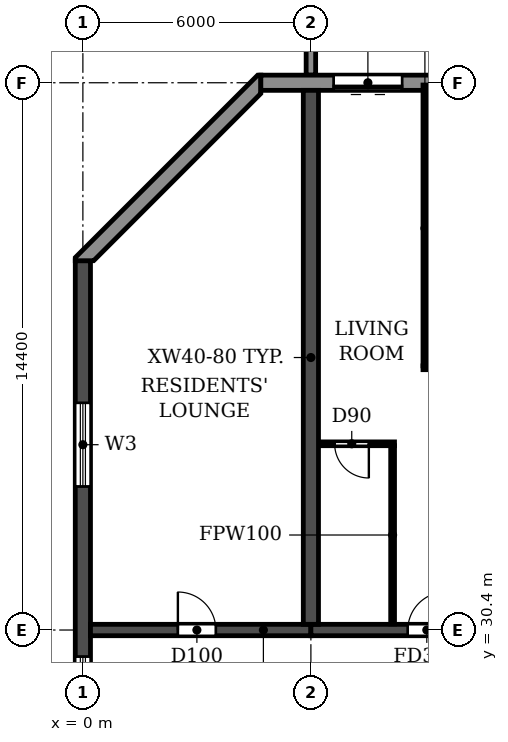
"""IFC4 building model, lengths in metres.
Left out: names, types, materials, properties, quantities, classifications, styles, units other than length and angle.
Written with IfcOpenShell. Run it as: python <this file> out.ifc"""

import sys

from ifc_helpers import new_model, si_unit, direction, frame, frame_2d, origin, place, context, subcontext, project, spatial, polyline, rectangle, outline, extrude, source, transform, mapped, element, fill, save


model = new_model("IFC4")
c1 = context("Model", 3, precision=1e-05, world=origin(), true_north=direction((0.0, 1.0)))
c2 = subcontext(c1, "Body", "Model", "MODEL_VIEW")
j1 = project(units=[si_unit("LENGTHUNIT", "METRE"), si_unit("PLANEANGLEUNIT", "RADIAN")], contexts=[c1])
p1 = place(None, origin())
s1 = spatial("IfcSite", under=j1, at=p1, CompositionType="ELEMENT")
p2 = place(p1, origin())
s2 = spatial("IfcBuilding", under=s1, at=p2, CompositionType="ELEMENT")
p3 = place(p2, frame((0.0, 0.0, 43.2)))
s3 = spatial("IfcBuildingStorey", under=s2, at=p3, CompositionType="ELEMENT", Elevation=43.2)
p4 = place(p3, frame((6.0, 30.55, 0.0), z_axis=(0.0, 0.0, 1.0), x_axis=(0.0, 1.0, 0.0)))
e1 = element("IfcWall", 1, at=p4, inside=s3, PredefinedType="SHEAR", context=c2, shape_type="SweptSolid", body=[
    extrude(rectangle(XDim=14.05, YDim=0.4, at=frame_2d((7.025, 0.0))), origin(), (0.0, 0.0, 1.0), 3.05),
])
p5 = place(p3, frame((0.0, 4.683, 0.0), z_axis=(0.0, 0.0, 1.0), x_axis=(0.0, 1.0, 0.0)))
e2 = element("IfcWall", 2, at=p5, inside=s3, PredefinedType="SHEAR", context=c2, shape_type="SweptSolid", body=[
    extrude(rectangle(XDim=35.434, YDim=0.4, at=frame_2d((17.717, 0.0))), origin(), (0.0, 0.0, 1.0), 3.05),
])
p6 = place(p5, frame((23.817, 0.0, 0.9)))
e3 = element("IfcOpeningElement", 3, at=p6, cuts=e2, PredefinedType="OPENING", context=c2, shape_type="SweptSolid", body=[
    extrude(rectangle(XDim=1.2, YDim=1.5, at=frame_2d((0.6, 0.75))), frame((0.0, 0.21, 0.0), z_axis=(0.0, -1.0, 0.0), x_axis=(1.0, 0.0, 0.0)), (0.0, 0.0, 1.0), 0.42),
])
p7 = place(p5, frame((8.017, 0.0, 0.9)))
e4 = element("IfcOpeningElement", 4, at=p7, cuts=e2, PredefinedType="OPENING", context=c2, shape_type="SweptSolid", body=[
    extrude(rectangle(XDim=1.2, YDim=1.5, at=frame_2d((0.6, 0.75))), frame((0.0, 0.21, 0.0), z_axis=(0.0, -1.0, 0.0), x_axis=(1.0, 0.0, 0.0)), (0.0, 0.0, 1.0), 0.42),
])
p8 = place(p5, frame((15.917, 0.0, 0.9)))
e5 = element("IfcOpeningElement", 5, at=p8, cuts=e2, PredefinedType="OPENING", context=c2, shape_type="SweptSolid", body=[
    extrude(rectangle(XDim=1.2, YDim=1.5, at=frame_2d((0.6, 0.75))), frame((0.0, 0.21, 0.0), z_axis=(0.0, -1.0, 0.0), x_axis=(1.0, 0.0, 0.0)), (0.0, 0.0, 1.0), 0.42),
])
p9 = place(p5, frame((29.493, 0.0, 0.6)))
e6 = element("IfcOpeningElement", 6, at=p9, cuts=e2, PredefinedType="OPENING", context=c2, shape_type="SweptSolid", body=[
    extrude(rectangle(XDim=2.2, YDim=1.8, at=frame_2d((1.1, 0.9))), frame((0.0, 0.21, 0.0), z_axis=(0.0, -1.0, 0.0), x_axis=(1.0, 0.0, 0.0)), (0.0, 0.0, 1.0), 0.42),
])
p10 = place(p5, frame((2.541, 0.0, 0.6)))
e7 = element("IfcOpeningElement", 7, at=p10, cuts=e2, PredefinedType="OPENING", context=c2, shape_type="SweptSolid", body=[
    extrude(rectangle(XDim=2.2, YDim=1.8, at=frame_2d((1.1, 0.9))), frame((0.0, 0.21, 0.0), z_axis=(0.0, -1.0, 0.0), x_axis=(1.0, 0.0, 0.0)), (0.0, 0.0, 1.0), 0.42),
])
p11 = place(p3, frame((0.2, 30.4, 0.0), z_axis=(0.0, 0.0, 1.0), x_axis=(1.0, 0.0, 0.0)))
e8 = element("IfcWall", 8, at=p11, inside=s3, PredefinedType="SHEAR", context=c2, shape_type="SweptSolid", body=[
    extrude(rectangle(XDim=5.8, YDim=0.3, at=frame_2d((2.9, 0.0))), origin(), (0.0, 0.0, 1.0), 2.45),
])
p12 = place(p11, frame((2.3, 0.0, 0.0)))
e9 = element("IfcOpeningElement", 9, at=p12, cuts=e8, PredefinedType="OPENING", context=c2, shape_type="SweptSolid", body=[
    extrude(rectangle(XDim=1.0, YDim=2.1, at=frame_2d((0.5, 1.05))), frame((0.0, 0.16, 0.0), z_axis=(0.0, -1.0, 0.0), x_axis=(1.0, 0.0, 0.0)), (0.0, 0.0, 1.0), 0.32),
])
p13 = place(p3, frame((6.0, 30.4, 0.0), z_axis=(0.0, 0.0, 1.0), x_axis=(1.0, 0.0, 0.0)))
e10 = element("IfcWall", 10, at=p13, inside=s3, PredefinedType="SHEAR", context=c2, shape_type="SweptSolid", body=[
    extrude(rectangle(XDim=6.0, YDim=0.3, at=frame_2d((3.0, 0.0))), origin(), (0.0, 0.0, 1.0), 2.45),
])
p14 = place(p13, frame((2.55, 0.0, 0.0)))
e11 = element("IfcOpeningElement", 11, at=p14, cuts=e10, PredefinedType="OPENING", context=c2, shape_type="SweptSolid", body=[
    extrude(rectangle(XDim=1.0, YDim=2.1, at=frame_2d((0.5, 1.05))), frame((0.0, 0.16, 0.0), z_axis=(0.0, -1.0, 0.0), x_axis=(1.0, 0.0, 0.0)), (0.0, 0.0, 1.0), 0.32),
])
p15 = place(p3, frame((97.317, 44.8, 0.0), z_axis=(0.0, 0.0, 1.0), x_axis=(-1.0, 0.0, 0.0)))
e12 = element("IfcWall", 12, at=p15, inside=s3, PredefinedType="STANDARD", context=c2, shape_type="SweptSolid", body=[
    extrude(rectangle(XDim=92.634, YDim=0.4, at=frame_2d((46.317, 0.0))), origin(), (0.0, 0.0, 1.0), 3.05),
])
p16 = place(p15, frame((88.917, 0.0, 0.0)))
e13 = element("IfcOpeningElement", 13, at=p16, cuts=e12, PredefinedType="OPENING", context=c2, shape_type="SweptSolid", body=[
    extrude(rectangle(XDim=1.8, YDim=2.4, at=frame_2d((0.9, 1.2))), frame((0.0, 0.21, 0.0), z_axis=(0.0, -1.0, 0.0), x_axis=(1.0, 0.0, 0.0)), (0.0, 0.0, 1.0), 0.42),
])
p17 = place(p15, frame((85.717, 0.0, 0.9)))
e14 = element("IfcOpeningElement", 14, at=p17, cuts=e12, PredefinedType="OPENING", context=c2, shape_type="SweptSolid", body=[
    extrude(rectangle(XDim=2.2, YDim=1.5, at=frame_2d((1.1, 0.75))), frame((0.0, 0.21, 0.0), z_axis=(0.0, -1.0, 0.0), x_axis=(1.0, 0.0, 0.0)), (0.0, 0.0, 1.0), 0.42),
])
p18 = place(p15, frame((82.717, 0.0, 0.9)))
e15 = element("IfcOpeningElement", 15, at=p18, cuts=e12, PredefinedType="OPENING", context=c2, shape_type="SweptSolid", body=[
    extrude(rectangle(XDim=2.2, YDim=1.5, at=frame_2d((1.1, 0.75))), frame((0.0, 0.21, 0.0), z_axis=(0.0, -1.0, 0.0), x_axis=(1.0, 0.0, 0.0)), (0.0, 0.0, 1.0), 0.42),
])
p19 = place(p15, frame((79.717, 0.0, 0.9)))
e16 = element("IfcOpeningElement", 16, at=p19, cuts=e12, PredefinedType="OPENING", context=c2, shape_type="SweptSolid", body=[
    extrude(rectangle(XDim=2.2, YDim=1.5, at=frame_2d((1.1, 0.75))), frame((0.0, 0.21, 0.0), z_axis=(0.0, -1.0, 0.0), x_axis=(1.0, 0.0, 0.0)), (0.0, 0.0, 1.0), 0.42),
])
p20 = place(p15, frame((76.717, 0.0, 0.9)))
e17 = element("IfcOpeningElement", 17, at=p20, cuts=e12, PredefinedType="OPENING", context=c2, shape_type="SweptSolid", body=[
    extrude(rectangle(XDim=2.2, YDim=1.5, at=frame_2d((1.1, 0.75))), frame((0.0, 0.21, 0.0), z_axis=(0.0, -1.0, 0.0), x_axis=(1.0, 0.0, 0.0)), (0.0, 0.0, 1.0), 0.42),
])
p21 = place(p15, frame((73.917, 0.0, 0.0)))
e18 = element("IfcOpeningElement", 18, at=p21, cuts=e12, PredefinedType="OPENING", context=c2, shape_type="SweptSolid", body=[
    extrude(rectangle(XDim=1.8, YDim=2.4, at=frame_2d((0.9, 1.2))), frame((0.0, 0.21, 0.0), z_axis=(0.0, -1.0, 0.0), x_axis=(1.0, 0.0, 0.0)), (0.0, 0.0, 1.0), 0.42),
])
p22 = place(p15, frame((70.717, 0.0, 0.9)))
e19 = element("IfcOpeningElement", 19, at=p22, cuts=e12, PredefinedType="OPENING", context=c2, shape_type="SweptSolid", body=[
    extrude(rectangle(XDim=2.2, YDim=1.5, at=frame_2d((1.1, 0.75))), frame((0.0, 0.21, 0.0), z_axis=(0.0, -1.0, 0.0), x_axis=(1.0, 0.0, 0.0)), (0.0, 0.0, 1.0), 0.42),
])
p23 = place(p15, frame((67.717, 0.0, 0.9)))
e20 = element("IfcOpeningElement", 20, at=p23, cuts=e12, PredefinedType="OPENING", context=c2, shape_type="SweptSolid", body=[
    extrude(rectangle(XDim=2.2, YDim=1.5, at=frame_2d((1.1, 0.75))), frame((0.0, 0.21, 0.0), z_axis=(0.0, -1.0, 0.0), x_axis=(1.0, 0.0, 0.0)), (0.0, 0.0, 1.0), 0.42),
])
p24 = place(p15, frame((64.717, 0.0, 0.9)))
e21 = element("IfcOpeningElement", 21, at=p24, cuts=e12, PredefinedType="OPENING", context=c2, shape_type="SweptSolid", body=[
    extrude(rectangle(XDim=2.2, YDim=1.5, at=frame_2d((1.1, 0.75))), frame((0.0, 0.21, 0.0), z_axis=(0.0, -1.0, 0.0), x_axis=(1.0, 0.0, 0.0)), (0.0, 0.0, 1.0), 0.42),
])
p25 = place(p15, frame((61.917, 0.0, 0.0)))
e22 = element("IfcOpeningElement", 22, at=p25, cuts=e12, PredefinedType="OPENING", context=c2, shape_type="SweptSolid", body=[
    extrude(rectangle(XDim=1.8, YDim=2.4, at=frame_2d((0.9, 1.2))), frame((0.0, 0.21, 0.0), z_axis=(0.0, -1.0, 0.0), x_axis=(1.0, 0.0, 0.0)), (0.0, 0.0, 1.0), 0.42),
])
p26 = place(p15, frame((58.717, 0.0, 0.9)))
e23 = element("IfcOpeningElement", 23, at=p26, cuts=e12, PredefinedType="OPENING", context=c2, shape_type="SweptSolid", body=[
    extrude(rectangle(XDim=2.2, YDim=1.5, at=frame_2d((1.1, 0.75))), frame((0.0, 0.21, 0.0), z_axis=(0.0, -1.0, 0.0), x_axis=(1.0, 0.0, 0.0)), (0.0, 0.0, 1.0), 0.42),
])
p27 = place(p15, frame((55.717, 0.0, 0.9)))
e24 = element("IfcOpeningElement", 24, at=p27, cuts=e12, PredefinedType="OPENING", context=c2, shape_type="SweptSolid", body=[
    extrude(rectangle(XDim=2.2, YDim=1.5, at=frame_2d((1.1, 0.75))), frame((0.0, 0.21, 0.0), z_axis=(0.0, -1.0, 0.0), x_axis=(1.0, 0.0, 0.0)), (0.0, 0.0, 1.0), 0.42),
])
p28 = place(p15, frame((52.717, 0.0, 0.9)))
e25 = element("IfcOpeningElement", 25, at=p28, cuts=e12, PredefinedType="OPENING", context=c2, shape_type="SweptSolid", body=[
    extrude(rectangle(XDim=2.2, YDim=1.5, at=frame_2d((1.1, 0.75))), frame((0.0, 0.21, 0.0), z_axis=(0.0, -1.0, 0.0), x_axis=(1.0, 0.0, 0.0)), (0.0, 0.0, 1.0), 0.42),
])
p29 = place(p15, frame((49.917, 0.0, 0.0)))
e26 = element("IfcOpeningElement", 26, at=p29, cuts=e12, PredefinedType="OPENING", context=c2, shape_type="SweptSolid", body=[
    extrude(rectangle(XDim=1.8, YDim=2.4, at=frame_2d((0.9, 1.2))), frame((0.0, 0.21, 0.0), z_axis=(0.0, -1.0, 0.0), x_axis=(1.0, 0.0, 0.0)), (0.0, 0.0, 1.0), 0.42),
])
p30 = place(p15, frame((46.717, 0.0, 0.9)))
e27 = element("IfcOpeningElement", 27, at=p30, cuts=e12, PredefinedType="OPENING", context=c2, shape_type="SweptSolid", body=[
    extrude(rectangle(XDim=2.2, YDim=1.5, at=frame_2d((1.1, 0.75))), frame((0.0, 0.21, 0.0), z_axis=(0.0, -1.0, 0.0), x_axis=(1.0, 0.0, 0.0)), (0.0, 0.0, 1.0), 0.42),
])
p31 = place(p15, frame((43.717, 0.0, 0.9)))
e28 = element("IfcOpeningElement", 28, at=p31, cuts=e12, PredefinedType="OPENING", context=c2, shape_type="SweptSolid", body=[
    extrude(rectangle(XDim=2.2, YDim=1.5, at=frame_2d((1.1, 0.75))), frame((0.0, 0.21, 0.0), z_axis=(0.0, -1.0, 0.0), x_axis=(1.0, 0.0, 0.0)), (0.0, 0.0, 1.0), 0.42),
])
p32 = place(p15, frame((40.717, 0.0, 0.9)))
e29 = element("IfcOpeningElement", 29, at=p32, cuts=e12, PredefinedType="OPENING", context=c2, shape_type="SweptSolid", body=[
    extrude(rectangle(XDim=2.2, YDim=1.5, at=frame_2d((1.1, 0.75))), frame((0.0, 0.21, 0.0), z_axis=(0.0, -1.0, 0.0), x_axis=(1.0, 0.0, 0.0)), (0.0, 0.0, 1.0), 0.42),
])
p33 = place(p15, frame((37.917, 0.0, 0.0)))
e30 = element("IfcOpeningElement", 30, at=p33, cuts=e12, PredefinedType="OPENING", context=c2, shape_type="SweptSolid", body=[
    extrude(rectangle(XDim=1.8, YDim=2.4, at=frame_2d((0.9, 1.2))), frame((0.0, 0.21, 0.0), z_axis=(0.0, -1.0, 0.0), x_axis=(1.0, 0.0, 0.0)), (0.0, 0.0, 1.0), 0.42),
])
p34 = place(p15, frame((34.717, 0.0, 0.9)))
e31 = element("IfcOpeningElement", 31, at=p34, cuts=e12, PredefinedType="OPENING", context=c2, shape_type="SweptSolid", body=[
    extrude(rectangle(XDim=2.2, YDim=1.5, at=frame_2d((1.1, 0.75))), frame((0.0, 0.21, 0.0), z_axis=(0.0, -1.0, 0.0), x_axis=(1.0, 0.0, 0.0)), (0.0, 0.0, 1.0), 0.42),
])
p35 = place(p15, frame((31.717, 0.0, 0.9)))
e32 = element("IfcOpeningElement", 32, at=p35, cuts=e12, PredefinedType="OPENING", context=c2, shape_type="SweptSolid", body=[
    extrude(rectangle(XDim=2.2, YDim=1.5, at=frame_2d((1.1, 0.75))), frame((0.0, 0.21, 0.0), z_axis=(0.0, -1.0, 0.0), x_axis=(1.0, 0.0, 0.0)), (0.0, 0.0, 1.0), 0.42),
])
p36 = place(p15, frame((28.717, 0.0, 0.9)))
e33 = element("IfcOpeningElement", 33, at=p36, cuts=e12, PredefinedType="OPENING", context=c2, shape_type="SweptSolid", body=[
    extrude(rectangle(XDim=2.2, YDim=1.5, at=frame_2d((1.1, 0.75))), frame((0.0, 0.21, 0.0), z_axis=(0.0, -1.0, 0.0), x_axis=(1.0, 0.0, 0.0)), (0.0, 0.0, 1.0), 0.42),
])
p37 = place(p15, frame((25.917, 0.0, 0.0)))
e34 = element("IfcOpeningElement", 34, at=p37, cuts=e12, PredefinedType="OPENING", context=c2, shape_type="SweptSolid", body=[
    extrude(rectangle(XDim=1.8, YDim=2.4, at=frame_2d((0.9, 1.2))), frame((0.0, 0.21, 0.0), z_axis=(0.0, -1.0, 0.0), x_axis=(1.0, 0.0, 0.0)), (0.0, 0.0, 1.0), 0.42),
])
p38 = place(p15, frame((22.917, 0.0, 0.0)))
e35 = element("IfcOpeningElement", 35, at=p38, cuts=e12, PredefinedType="OPENING", context=c2, shape_type="SweptSolid", body=[
    extrude(rectangle(XDim=1.8, YDim=2.4, at=frame_2d((0.9, 1.2))), frame((0.0, 0.21, 0.0), z_axis=(0.0, -1.0, 0.0), x_axis=(1.0, 0.0, 0.0)), (0.0, 0.0, 1.0), 0.42),
])
p39 = place(p15, frame((19.717, 0.0, 0.9)))
e36 = element("IfcOpeningElement", 36, at=p39, cuts=e12, PredefinedType="OPENING", context=c2, shape_type="SweptSolid", body=[
    extrude(rectangle(XDim=2.2, YDim=1.5, at=frame_2d((1.1, 0.75))), frame((0.0, 0.21, 0.0), z_axis=(0.0, -1.0, 0.0), x_axis=(1.0, 0.0, 0.0)), (0.0, 0.0, 1.0), 0.42),
])
p40 = place(p15, frame((16.717, 0.0, 0.9)))
e37 = element("IfcOpeningElement", 37, at=p40, cuts=e12, PredefinedType="OPENING", context=c2, shape_type="SweptSolid", body=[
    extrude(rectangle(XDim=2.2, YDim=1.5, at=frame_2d((1.1, 0.75))), frame((0.0, 0.21, 0.0), z_axis=(0.0, -1.0, 0.0), x_axis=(1.0, 0.0, 0.0)), (0.0, 0.0, 1.0), 0.42),
])
p41 = place(p15, frame((13.717, 0.0, 0.9)))
e38 = element("IfcOpeningElement", 38, at=p41, cuts=e12, PredefinedType="OPENING", context=c2, shape_type="SweptSolid", body=[
    extrude(rectangle(XDim=2.2, YDim=1.5, at=frame_2d((1.1, 0.75))), frame((0.0, 0.21, 0.0), z_axis=(0.0, -1.0, 0.0), x_axis=(1.0, 0.0, 0.0)), (0.0, 0.0, 1.0), 0.42),
])
p42 = place(p15, frame((10.717, 0.0, 0.9)))
e39 = element("IfcOpeningElement", 39, at=p42, cuts=e12, PredefinedType="OPENING", context=c2, shape_type="SweptSolid", body=[
    extrude(rectangle(XDim=2.2, YDim=1.5, at=frame_2d((1.1, 0.75))), frame((0.0, 0.21, 0.0), z_axis=(0.0, -1.0, 0.0), x_axis=(1.0, 0.0, 0.0)), (0.0, 0.0, 1.0), 0.42),
])
p43 = place(p15, frame((7.917, 0.0, 0.0)))
e40 = element("IfcOpeningElement", 40, at=p43, cuts=e12, PredefinedType="OPENING", context=c2, shape_type="SweptSolid", body=[
    extrude(rectangle(XDim=1.8, YDim=2.4, at=frame_2d((0.9, 1.2))), frame((0.0, 0.21, 0.0), z_axis=(0.0, -1.0, 0.0), x_axis=(1.0, 0.0, 0.0)), (0.0, 0.0, 1.0), 0.42),
])
p44 = place(p15, frame((4.717, 0.0, 0.9)))
e41 = element("IfcOpeningElement", 41, at=p44, cuts=e12, PredefinedType="OPENING", context=c2, shape_type="SweptSolid", body=[
    extrude(rectangle(XDim=2.2, YDim=1.5, at=frame_2d((1.1, 0.75))), frame((0.0, 0.21, 0.0), z_axis=(0.0, -1.0, 0.0), x_axis=(1.0, 0.0, 0.0)), (0.0, 0.0, 1.0), 0.42),
])
p45 = place(p15, frame((1.917, 0.0, 0.0)))
e42 = element("IfcOpeningElement", 42, at=p45, cuts=e12, PredefinedType="OPENING", context=c2, shape_type="SweptSolid", body=[
    extrude(rectangle(XDim=1.8, YDim=2.4, at=frame_2d((0.9, 1.2))), frame((0.0, 0.21, 0.0), z_axis=(0.0, -1.0, 0.0), x_axis=(1.0, 0.0, 0.0)), (0.0, 0.0, 1.0), 0.42),
])
p46 = place(p3, origin())
e43 = element("IfcWall", 43, at=p46, inside=s3, PredefinedType="STANDARD", context=c2, shape_type="SweptSolid", body=[
    extrude(outline(polyline([(4.683, 45.0), (4.6, 45.0), (-0.2, 40.2), (-0.2, 40.117), (0.283, 40.117), (4.683, 44.517), (4.683, 45.0)])), origin(), (0.0, 0.0, 1.0), 3.05),
])
m1 = source(origin(), c2, "Body", "SweptSolid", [
    extrude(outline(polyline([(0.0, 0.0), (0.25, 0.0), (0.25, 3.1), (0.0, 3.1), (0.0, 0.0)])), origin(), (0.0, 0.0, 1.0), 3.1),
])
p47 = place(p3, frame((5.875, 45.0, 0.0)))
e44 = element("IfcWall", 44, at=p47, inside=s3, PredefinedType="STANDARD", context=c2, shape_type="MappedRepresentation", body=[
    mapped(m1, transform((0.0, 0.0, 0.0))),
])
p48 = place(p3, frame((6.21, 35.3, 0.0), z_axis=(0.0, 0.0, 1.0), x_axis=(1.0, 0.0, 0.0)))
e45 = element("IfcWall", 45, at=p48, inside=s3, PredefinedType="PARTITIONING", context=c2, shape_type="SweptSolid", body=[
    extrude(rectangle(XDim=1.99, YDim=0.1, at=frame_2d((0.995, 0.0))), origin(), (0.0, 0.0, 1.0), 3.05),
])
p49 = place(p48, frame((0.415, 0.0, 0.0)))
e46 = element("IfcOpeningElement", 46, at=p49, cuts=e45, PredefinedType="OPENING", context=c2, shape_type="SweptSolid", body=[
    extrude(rectangle(XDim=0.9, YDim=2.1, at=frame_2d((0.45, 1.05))), frame((0.0, 0.06, 0.0), z_axis=(0.0, -1.0, 0.0), x_axis=(1.0, 0.0, 0.0)), (0.0, 0.0, 1.0), 0.12),
])
p50 = place(p3, frame((8.95, 37.3, 0.0), z_axis=(0.0, 0.0, 1.0), x_axis=(1.0, 0.0, 0.0)))
e47 = element("IfcWall", 47, at=p50, inside=s3, PredefinedType="PARTITIONING", context=c2, shape_type="SweptSolid", body=[
    extrude(rectangle(XDim=2.84, YDim=0.1, at=frame_2d((1.42, 0.0))), origin(), (0.0, 0.0, 1.0), 3.05),
])
p51 = place(p50, frame((0.55, 0.0, 0.0)))
e48 = element("IfcOpeningElement", 48, at=p51, cuts=e47, PredefinedType="OPENING", context=c2, shape_type="SweptSolid", body=[
    extrude(rectangle(XDim=0.9, YDim=2.1, at=frame_2d((0.45, 1.05))), frame((0.0, 0.06, 0.0), z_axis=(0.0, -1.0, 0.0), x_axis=(1.0, 0.0, 0.0)), (0.0, 0.0, 1.0), 0.12),
])
p52 = place(p3, frame((8.15, 30.56, 0.0), z_axis=(0.0, 0.0, 1.0), x_axis=(0.0, 1.0, 0.0)))
e49 = element("IfcWall", 49, at=p52, inside=s3, PredefinedType="PARTITIONING", context=c2, shape_type="SweptSolid", body=[
    extrude(rectangle(XDim=4.69, YDim=0.1, at=frame_2d((2.345, 0.0))), origin(), (0.0, 0.0, 1.0), 3.05),
])
p53 = place(p3, frame((9.0, 37.35, 0.0), z_axis=(0.0, 0.0, 1.0), x_axis=(0.0, 1.0, 0.0)))
e50 = element("IfcWall", 50, at=p53, inside=s3, PredefinedType="PARTITIONING", context=c2, shape_type="SweptSolid", body=[
    extrude(rectangle(XDim=7.39, YDim=0.1, at=frame_2d((3.695, 0.0))), origin(), (0.0, 0.0, 1.0), 3.05),
])
p54 = place(p16, origin())
e51 = element("IfcDoor", 51, at=p54, inside=s3, OperationType="DOUBLE_DOOR_SLIDING", PredefinedType="DOOR", context=c2, shape_type="SweptSolid", body=[
    extrude(rectangle(XDim=1.8, YDim=2.4, at=frame_2d((0.9, 1.2))), frame((0.0, 0.025, 0.0), z_axis=(0.0, -1.0, 0.0), x_axis=(1.0, 0.0, 0.0)), (0.0, 0.0, 1.0), 0.05),
])
fill(e13, e51)
p55 = place(p6, origin())
e52 = element("IfcWindow", 52, at=p55, inside=s3, PartitioningType="SINGLE_PANEL", PredefinedType="WINDOW", context=c2, shape_type="SweptSolid", body=[
    extrude(rectangle(XDim=1.2, YDim=1.5, at=frame_2d((0.6, 0.75))), frame((0.0, 0.03, 0.0), z_axis=(0.0, -1.0, 0.0), x_axis=(1.0, 0.0, 0.0)), (0.0, 0.0, 1.0), 0.06),
])
fill(e3, e52)
p56 = place(p9, origin())
e53 = element("IfcWindow", 53, at=p56, inside=s3, PartitioningType="DOUBLE_PANEL_HORIZONTAL", PredefinedType="WINDOW", context=c2, shape_type="SweptSolid", body=[
    extrude(rectangle(XDim=2.2, YDim=1.8, at=frame_2d((1.1, 0.9))), frame((0.0, 0.03, 0.0), z_axis=(0.0, -1.0, 0.0), x_axis=(1.0, 0.0, 0.0)), (0.0, 0.0, 1.0), 0.06),
])
fill(e6, e53)
p57 = place(p12, origin())
e54 = element("IfcDoor", 54, at=p57, inside=s3, OperationType="SINGLE_SWING_LEFT", PredefinedType="DOOR", context=c2, shape_type="SweptSolid", body=[
    extrude(rectangle(XDim=1.0, YDim=2.1, at=frame_2d((0.5, 1.05))), frame((0.0, 0.025, 0.0), z_axis=(0.0, -1.0, 0.0), x_axis=(1.0, 0.0, 0.0)), (0.0, 0.0, 1.0), 0.05),
])
fill(e9, e54)
p58 = place(p49, frame((0.9, 0.0, 0.0), z_axis=(0.0, 0.0, 1.0), x_axis=(-1.0, 0.0, 0.0)))
e55 = element("IfcDoor", 55, at=p58, inside=s3, OperationType="SINGLE_SWING_LEFT", PredefinedType="DOOR", context=c2, shape_type="SweptSolid", body=[
    extrude(rectangle(XDim=0.9, YDim=2.1, at=frame_2d((0.45, 1.05))), frame((0.0, 0.025, 0.0), z_axis=(0.0, -1.0, 0.0), x_axis=(1.0, 0.0, 0.0)), (0.0, 0.0, 1.0), 0.05),
])
fill(e46, e55)
p59 = place(p14, origin())
e56 = element("IfcDoor", 56, at=p59, inside=s3, OperationType="SINGLE_SWING_RIGHT", PredefinedType="DOOR", context=c2, shape_type="SweptSolid", body=[
    extrude(rectangle(XDim=1.0, YDim=2.1, at=frame_2d((0.5, 1.05))), frame((0.0, 0.025, 0.0), z_axis=(0.0, -1.0, 0.0), x_axis=(1.0, 0.0, 0.0)), (0.0, 0.0, 1.0), 0.05),
])
fill(e11, e56)
save(model, sys.argv[1])
